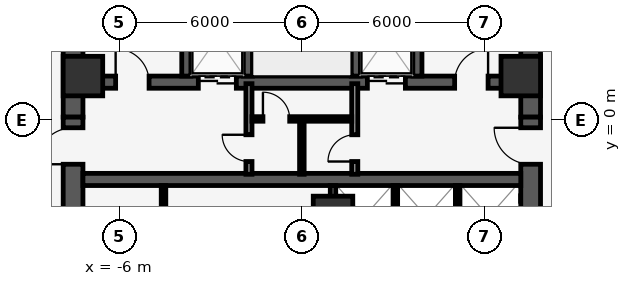
"""IFC4 building model, lengths in metres.
Left out: names, types, materials, properties, quantities, classifications, styles, units other than length and angle.
Written with IfcOpenShell. Run it as: python <this file> out.ifc"""

import sys

from ifc_helpers import new_model, si_unit, direction, frame, frame_2d, origin, origin_2d, place, context, subcontext, project, spatial, rectangle, extrude, element, fill, save


model = new_model("IFC4")
c1 = context("Model", 3, precision=1e-05, world=origin(), true_north=direction((0.0, 1.0)))
c2 = subcontext(c1, "Body", "Model", "MODEL_VIEW")
j1 = project(units=[si_unit("LENGTHUNIT", "METRE"), si_unit("PLANEANGLEUNIT", "RADIAN")], contexts=[c1])
p1 = place(None, origin())
s1 = spatial("IfcSite", under=j1, at=p1, CompositionType="ELEMENT")
p2 = place(p1, origin())
s2 = spatial("IfcBuilding", under=s1, at=p2, CompositionType="ELEMENT")
p3 = place(p2, frame((0.0, 0.0, 144.5)))
s3 = spatial("IfcBuildingStorey", under=s2, at=p3, CompositionType="ELEMENT", Elevation=144.5)
p4 = place(p3, frame((-7.2, 1.25, 0.0), z_axis=(0.0, 0.0, 1.0), x_axis=(1.0, 0.0, 0.0)))
e1 = element("IfcWall", 1, at=p4, inside=s3, PredefinedType="SHEAR", context=c2, shape_type="SweptSolid", body=[
    extrude(rectangle(XDim=14.4, YDim=0.4, at=frame_2d((7.2, 0.0))), origin(), (0.0, 0.0, 1.0), 3.85),
])
p5 = place(p4, frame((3.795, 0.0, 0.0)))
e2 = element("IfcOpeningElement", 2, at=p5, cuts=e1, PredefinedType="OPENING", context=c2, shape_type="SweptSolid", body=[
    extrude(rectangle(XDim=1.25, YDim=2.25, at=frame_2d((0.625, 1.125))), frame((0.0, 0.21, 0.0), z_axis=(0.0, -1.0, 0.0), x_axis=(1.0, 0.0, 0.0)), (0.0, 0.0, 1.0), 0.42),
])
p6 = place(p4, frame((9.355, 0.0, 0.0)))
e3 = element("IfcOpeningElement", 3, at=p6, cuts=e1, PredefinedType="OPENING", context=c2, shape_type="SweptSolid", body=[
    extrude(rectangle(XDim=1.25, YDim=2.25, at=frame_2d((0.625, 1.125))), frame((0.0, 0.21, 0.0), z_axis=(0.0, -1.0, 0.0), x_axis=(1.0, 0.0, 0.0)), (0.0, 0.0, 1.0), 0.42),
])
p7 = place(p4, frame((1.075, 0.0, 0.0)))
e4 = element("IfcOpeningElement", 4, at=p7, cuts=e1, PredefinedType="OPENING", context=c2, shape_type="SweptSolid", body=[
    extrude(rectangle(XDim=1.1, YDim=2.15, at=frame_2d((0.55, 1.075))), frame((0.0, 0.21, 0.0), z_axis=(0.0, -1.0, 0.0), x_axis=(1.0, 0.0, 0.0)), (0.0, 0.0, 1.0), 0.42),
])
p8 = place(p4, frame((12.225, 0.0, 0.0)))
e5 = element("IfcOpeningElement", 5, at=p8, cuts=e1, PredefinedType="OPENING", context=c2, shape_type="SweptSolid", body=[
    extrude(rectangle(XDim=1.1, YDim=2.15, at=frame_2d((0.55, 1.075))), frame((0.0, 0.21, 0.0), z_axis=(0.0, -1.0, 0.0), x_axis=(1.0, 0.0, 0.0)), (0.0, 0.0, 1.0), 0.42),
])
for number, where, z_axis, x_axis in (
    (6, (-3.8, 1.45, 0.0), (0.0, 0.0, 1.0), (0.0, 1.0, 0.0)),
    (7, (-1.775, 1.45, 0.0), (0.0, 0.0, 1.0), (0.0, 1.0, 0.0)),
    (8, (1.775, 1.45, 0.0), (0.0, 0.0, 1.0), (0.0, 1.0, 0.0)),
    (9, (3.8, 1.45, 0.0), (0.0, 0.0, 1.0), (0.0, 1.0, 0.0)),
):
    element("IfcWall", number, at=place(p3, frame(where, z_axis=z_axis, x_axis=x_axis)), inside=s3, PredefinedType="SHEAR", context=c2, shape_type="SweptSolid", body=[
        extrude(rectangle(XDim=7.7, YDim=0.3, at=frame_2d((3.85, 0.0))), origin(), (0.0, 0.0, 1.0), 3.85),
    ])
for number, where, z_axis, x_axis in (
    (10, (-7.525, 0.1, 0.0), (0.0, 0.0, 1.0), (0.0, 1.0, 0.0)),
    (11, (7.525, 0.1, 0.0), (0.0, 0.0, 1.0), (0.0, 1.0, 0.0)),
):
    element("IfcWall", number, at=place(p3, frame(where, z_axis=z_axis, x_axis=x_axis)), inside=s3, PredefinedType="SHEAR", context=c2, shape_type="SweptSolid", body=[
        extrude(rectangle(XDim=9.05, YDim=0.65, at=frame_2d((4.525, 0.0))), origin(), (0.0, 0.0, 1.0), 3.85),
    ])
p9 = place(p3, frame((-7.525, -8.925, 0.0), z_axis=(0.0, 0.0, 1.0), x_axis=(0.0, 1.0, 0.0)))
e12 = element("IfcWall", 12, at=p9, inside=s3, PredefinedType="SHEAR", context=c2, shape_type="SweptSolid", body=[
    extrude(rectangle(XDim=9.025, YDim=0.65, at=frame_2d((4.513, 0.0))), origin(), (0.0, 0.0, 1.0), 3.85),
])
p10 = place(p9, frame((2.565, 0.0, 0.0)))
e13 = element("IfcOpeningElement", 13, at=p10, cuts=e12, PredefinedType="OPENING", context=c2, shape_type="SweptSolid", body=[
    extrude(rectangle(XDim=1.8, YDim=2.2, at=frame_2d((0.9, 1.1))), frame((0.0, 0.335, 0.0), z_axis=(0.0, -1.0, 0.0), x_axis=(1.0, 0.0, 0.0)), (0.0, 0.0, 1.0), 0.67),
])
p11 = place(p9, frame((7.475, 0.0, 0.0)))
e14 = element("IfcOpeningElement", 14, at=p11, cuts=e12, PredefinedType="OPENING", context=c2, shape_type="SweptSolid", body=[
    extrude(rectangle(XDim=1.2, YDim=2.15, at=frame_2d((0.6, 1.075))), frame((0.0, 0.335, 0.0), z_axis=(0.0, -1.0, 0.0), x_axis=(1.0, 0.0, 0.0)), (0.0, 0.0, 1.0), 0.67),
])
p12 = place(p3, frame((7.525, -8.925, 0.0), z_axis=(0.0, 0.0, 1.0), x_axis=(0.0, 1.0, 0.0)))
e15 = element("IfcWall", 15, at=p12, inside=s3, PredefinedType="SHEAR", context=c2, shape_type="SweptSolid", body=[
    extrude(rectangle(XDim=9.025, YDim=0.65, at=frame_2d((4.513, 0.0))), origin(), (0.0, 0.0, 1.0), 3.85),
])
p13 = place(p12, frame((2.565, 0.0, 0.0)))
e16 = element("IfcOpeningElement", 16, at=p13, cuts=e15, PredefinedType="OPENING", context=c2, shape_type="SweptSolid", body=[
    extrude(rectangle(XDim=1.8, YDim=2.2, at=frame_2d((0.9, 1.1))), frame((0.0, 0.335, 0.0), z_axis=(0.0, -1.0, 0.0), x_axis=(1.0, 0.0, 0.0)), (0.0, 0.0, 1.0), 0.67),
])
p14 = place(p12, frame((7.475, 0.0, 0.0)))
e17 = element("IfcOpeningElement", 17, at=p14, cuts=e15, PredefinedType="OPENING", context=c2, shape_type="SweptSolid", body=[
    extrude(rectangle(XDim=1.2, YDim=2.15, at=frame_2d((0.6, 1.075))), frame((0.0, 0.335, 0.0), z_axis=(0.0, -1.0, 0.0), x_axis=(1.0, 0.0, 0.0)), (0.0, 0.0, 1.0), 0.67),
])
p15 = place(p3, frame((-7.2, -1.95, 0.0), z_axis=(0.0, 0.0, 1.0), x_axis=(1.0, 0.0, 0.0)))
e18 = element("IfcWall", 18, at=p15, inside=s3, PredefinedType="SHEAR", context=c2, shape_type="SweptSolid", body=[
    extrude(rectangle(XDim=14.4, YDim=0.4, at=frame_2d((7.2, 0.0))), origin(), (0.0, 0.0, 1.0), 3.85),
])
for number, where, z_axis, x_axis in (
    (19, (7.2, 1.45, 0.0), (0.0, 0.0, 1.0), (1.0, 0.0, 0.0)),
    (20, (-7.2, 1.45, 0.0), (0.0, 0.0, 1.0), (1.0, 0.0, 0.0)),
    (21, (1.025, -3.15, 0.0), (0.0, 0.0, 1.0), (1.0, 0.0, 0.0)),
):
    element("IfcColumn", number, at=place(p3, frame(where, z_axis=z_axis, x_axis=x_axis)), inside=s3, PredefinedType="COLUMN", context=c2, shape_type="SweptSolid", body=[
        extrude(rectangle(XDim=1.3, YDim=1.3, at=origin_2d()), origin(), (0.0, 0.0, 1.0), 4.1),
    ])
p16 = place(p3, frame((-8.762, 34.748, 0.0), z_axis=(0.0, 0.0, 1.0), x_axis=(0.780669916438, -0.624943582708, 0.0)))
e22 = element("IfcWall", 22, at=p16, inside=s3, PredefinedType="STANDARD", context=c2, shape_type="SweptSolid", body=[
    extrude(rectangle(XDim=58.093, YDim=0.3, at=frame_2d((29.046, 0.0))), origin(), (0.0, 0.0, 1.0), 3.85),
])
p17 = place(p16, frame((5.947, 0.0, 0.85)))
e23 = element("IfcOpeningElement", 23, at=p17, cuts=e22, PredefinedType="OPENING", context=c2, shape_type="SweptSolid", body=[
    extrude(rectangle(XDim=1.4, YDim=2.2, at=frame_2d((0.7, 1.1))), frame((0.0, 0.16, 0.0), z_axis=(0.0, -1.0, 0.0), x_axis=(1.0, 0.0, 0.0)), (0.0, 0.0, 1.0), 0.32),
])
p18 = place(p16, frame((11.547, 0.0, 0.85)))
e24 = element("IfcOpeningElement", 24, at=p18, cuts=e22, PredefinedType="OPENING", context=c2, shape_type="SweptSolid", body=[
    extrude(rectangle(XDim=1.4, YDim=2.2, at=frame_2d((0.7, 1.1))), frame((0.0, 0.16, 0.0), z_axis=(0.0, -1.0, 0.0), x_axis=(1.0, 0.0, 0.0)), (0.0, 0.0, 1.0), 0.32),
])
p19 = place(p16, frame((17.146, 0.0, 0.85)))
e25 = element("IfcOpeningElement", 25, at=p19, cuts=e22, PredefinedType="OPENING", context=c2, shape_type="SweptSolid", body=[
    extrude(rectangle(XDim=1.4, YDim=2.2, at=frame_2d((0.7, 1.1))), frame((0.0, 0.16, 0.0), z_axis=(0.0, -1.0, 0.0), x_axis=(1.0, 0.0, 0.0)), (0.0, 0.0, 1.0), 0.32),
])
p20 = place(p16, frame((22.747, 0.0, 0.85)))
e26 = element("IfcOpeningElement", 26, at=p20, cuts=e22, PredefinedType="OPENING", context=c2, shape_type="SweptSolid", body=[
    extrude(rectangle(XDim=1.4, YDim=2.2, at=frame_2d((0.7, 1.1))), frame((0.0, 0.16, 0.0), z_axis=(0.0, -1.0, 0.0), x_axis=(1.0, 0.0, 0.0)), (0.0, 0.0, 1.0), 0.32),
])
p21 = place(p16, frame((28.347, 0.0, 0.85)))
e27 = element("IfcOpeningElement", 27, at=p21, cuts=e22, PredefinedType="OPENING", context=c2, shape_type="SweptSolid", body=[
    extrude(rectangle(XDim=1.4, YDim=2.2, at=frame_2d((0.7, 1.1))), frame((0.0, 0.16, 0.0), z_axis=(0.0, -1.0, 0.0), x_axis=(1.0, 0.0, 0.0)), (0.0, 0.0, 1.0), 0.32),
])
p22 = place(p16, frame((33.947, 0.0, 0.85)))
e28 = element("IfcOpeningElement", 28, at=p22, cuts=e22, PredefinedType="OPENING", context=c2, shape_type="SweptSolid", body=[
    extrude(rectangle(XDim=1.4, YDim=2.2, at=frame_2d((0.7, 1.1))), frame((0.0, 0.16, 0.0), z_axis=(0.0, -1.0, 0.0), x_axis=(1.0, 0.0, 0.0)), (0.0, 0.0, 1.0), 0.32),
])
p23 = place(p16, frame((39.547, 0.0, 0.85)))
e29 = element("IfcOpeningElement", 29, at=p23, cuts=e22, PredefinedType="OPENING", context=c2, shape_type="SweptSolid", body=[
    extrude(rectangle(XDim=1.4, YDim=2.2, at=frame_2d((0.7, 1.1))), frame((0.0, 0.16, 0.0), z_axis=(0.0, -1.0, 0.0), x_axis=(1.0, 0.0, 0.0)), (0.0, 0.0, 1.0), 0.32),
])
p24 = place(p16, frame((45.146, 0.0, 0.85)))
e30 = element("IfcOpeningElement", 30, at=p24, cuts=e22, PredefinedType="OPENING", context=c2, shape_type="SweptSolid", body=[
    extrude(rectangle(XDim=1.4, YDim=2.2, at=frame_2d((0.7, 1.1))), frame((0.0, 0.16, 0.0), z_axis=(0.0, -1.0, 0.0), x_axis=(1.0, 0.0, 0.0)), (0.0, 0.0, 1.0), 0.32),
])
p25 = place(p16, frame((50.747, 0.0, 0.85)))
e31 = element("IfcOpeningElement", 31, at=p25, cuts=e22, PredefinedType="OPENING", context=c2, shape_type="SweptSolid", body=[
    extrude(rectangle(XDim=1.4, YDim=2.2, at=frame_2d((0.7, 1.1))), frame((0.0, 0.16, 0.0), z_axis=(0.0, -1.0, 0.0), x_axis=(1.0, 0.0, 0.0)), (0.0, 0.0, 1.0), 0.32),
])
p26 = place(p3, frame((1.025, -4.18, 0.0), z_axis=(0.0, 0.0, 1.0), x_axis=(0.0, 1.0, 0.0)))
e32 = element("IfcWall", 32, at=p26, inside=s3, PredefinedType="PARTITIONING", context=c2, shape_type="SweptSolid", body=[
    extrude(rectangle(XDim=2.03, YDim=0.18, at=frame_2d((1.015, 0.0))), origin(), (0.0, 0.0, 1.0), 2.898),
])
for number, where, z_axis, x_axis in (
    (33, (-4.55, -4.18, 0.0), (0.0, 0.0, 1.0), (0.0, 1.0, 0.0)),
    (34, (3.075, -4.18, 0.0), (0.0, 0.0, 1.0), (0.0, 1.0, 0.0)),
    (35, (5.125, -4.18, 0.0), (0.0, 0.0, 1.0), (0.0, 1.0, 0.0)),
):
    element("IfcWall", number, at=place(p3, frame(where, z_axis=z_axis, x_axis=x_axis)), inside=s3, PredefinedType="PARTITIONING", context=c2, shape_type="SweptSolid", body=[
        extrude(rectangle(XDim=2.03, YDim=0.15, at=frame_2d((1.015, 0.0))), origin(), (0.0, 0.0, 1.0), 3.85),
    ])
p27 = place(p3, frame((-1.74, -1.78, 0.0), z_axis=(0.0, 0.0, 1.0), x_axis=(0.0, 1.0, 0.0)))
e36 = element("IfcWall", 36, at=p27, inside=s3, PredefinedType="PARTITIONING", context=c2, shape_type="SweptSolid", body=[
    extrude(rectangle(XDim=2.98, YDim=0.2, at=frame_2d((1.49, 0.0))), origin(), (0.0, 0.0, 1.0), 3.85),
])
p28 = place(p27, frame((0.42, 0.0, 0.0)))
e37 = element("IfcOpeningElement", 37, at=p28, cuts=e36, PredefinedType="OPENING", context=c2, shape_type="SweptSolid", body=[
    extrude(rectangle(XDim=0.88, YDim=2.15, at=frame_2d((0.44, 1.075))), frame((0.0, 0.11, 0.0), z_axis=(0.0, -1.0, 0.0), x_axis=(1.0, 0.0, 0.0)), (0.0, 0.0, 1.0), 0.22),
])
p29 = place(p3, frame((1.74, -1.78, 0.0), z_axis=(0.0, 0.0, 1.0), x_axis=(0.0, 1.0, 0.0)))
e38 = element("IfcWall", 38, at=p29, inside=s3, PredefinedType="PARTITIONING", context=c2, shape_type="SweptSolid", body=[
    extrude(rectangle(XDim=2.98, YDim=0.2, at=frame_2d((1.49, 0.0))), origin(), (0.0, 0.0, 1.0), 3.85),
])
p30 = place(p29, frame((0.42, 0.0, 0.0)))
e39 = element("IfcOpeningElement", 39, at=p30, cuts=e38, PredefinedType="OPENING", context=c2, shape_type="SweptSolid", body=[
    extrude(rectangle(XDim=0.88, YDim=2.15, at=frame_2d((0.44, 1.075))), frame((0.0, 0.11, 0.0), z_axis=(0.0, -1.0, 0.0), x_axis=(1.0, 0.0, 0.0)), (0.0, 0.0, 1.0), 0.22),
])
p31 = place(p3, frame((-1.64, 0.04, 0.0), z_axis=(0.0, 0.0, 1.0), x_axis=(1.0, 0.0, 0.0)))
e40 = element("IfcWall", 40, at=p31, inside=s3, PredefinedType="PARTITIONING", context=c2, shape_type="SweptSolid", body=[
    extrude(rectangle(XDim=3.28, YDim=0.15, at=frame_2d((1.64, 0.0))), origin(), (0.0, 0.0, 1.0), 3.85),
])
p32 = place(p31, frame((0.36, 0.0, 0.0)))
e41 = element("IfcOpeningElement", 41, at=p32, cuts=e40, PredefinedType="OPENING", context=c2, shape_type="SweptSolid", body=[
    extrude(rectangle(XDim=0.88, YDim=2.1, at=frame_2d((0.44, 1.05))), frame((0.0, 0.085, 0.0), z_axis=(0.0, -1.0, 0.0), x_axis=(1.0, 0.0, 0.0)), (0.0, 0.0, 1.0), 0.17),
])
p33 = place(p3, frame((0.0, -1.78, 0.0), z_axis=(0.0, 0.0, 1.0), x_axis=(0.0, 1.0, 0.0)))
e42 = element("IfcWall", 42, at=p33, inside=s3, PredefinedType="PARTITIONING", context=c2, shape_type="SweptSolid", body=[
    extrude(rectangle(XDim=1.73, YDim=0.15, at=frame_2d((0.865, 0.0))), origin(), (0.0, 0.0, 1.0), 3.85),
])
p34 = place(p5, origin())
e43 = element("IfcDoor", 43, at=p34, inside=s3, OperationType="DOUBLE_DOOR_SLIDING", PredefinedType="DOOR", context=c2, shape_type="SweptSolid", body=[
    extrude(rectangle(XDim=1.25, YDim=2.25, at=frame_2d((0.625, 1.125))), frame((0.0, 0.025, 0.0), z_axis=(0.0, -1.0, 0.0), x_axis=(1.0, 0.0, 0.0)), (0.0, 0.0, 1.0), 0.05),
])
fill(e2, e43)
p35 = place(p6, origin())
e44 = element("IfcDoor", 44, at=p35, inside=s3, OperationType="DOUBLE_DOOR_SLIDING", PredefinedType="DOOR", context=c2, shape_type="SweptSolid", body=[
    extrude(rectangle(XDim=1.25, YDim=2.25, at=frame_2d((0.625, 1.125))), frame((0.0, 0.025, 0.0), z_axis=(0.0, -1.0, 0.0), x_axis=(1.0, 0.0, 0.0)), (0.0, 0.0, 1.0), 0.05),
])
fill(e3, e44)
p36 = place(p7, origin())
e45 = element("IfcDoor", 45, at=p36, inside=s3, OperationType="SINGLE_SWING_LEFT", PredefinedType="DOOR", context=c2, shape_type="SweptSolid", body=[
    extrude(rectangle(XDim=1.1, YDim=2.15, at=frame_2d((0.55, 1.075))), frame((0.0, 0.025, 0.0), z_axis=(0.0, -1.0, 0.0), x_axis=(1.0, 0.0, 0.0)), (0.0, 0.0, 1.0), 0.05),
])
fill(e4, e45)
p37 = place(p8, origin())
e46 = element("IfcDoor", 46, at=p37, inside=s3, OperationType="SINGLE_SWING_RIGHT", PredefinedType="DOOR", context=c2, shape_type="SweptSolid", body=[
    extrude(rectangle(XDim=1.1, YDim=2.15, at=frame_2d((0.55, 1.075))), frame((0.0, 0.025, 0.0), z_axis=(0.0, -1.0, 0.0), x_axis=(1.0, 0.0, 0.0)), (0.0, 0.0, 1.0), 0.05),
])
fill(e5, e46)
p38 = place(p11, origin())
e47 = element("IfcDoor", 47, at=p38, inside=s3, OperationType="SINGLE_SWING_LEFT", PredefinedType="DOOR", context=c2, shape_type="SweptSolid", body=[
    extrude(rectangle(XDim=1.2, YDim=2.15, at=frame_2d((0.6, 1.075))), frame((0.0, 0.025, 0.0), z_axis=(0.0, -1.0, 0.0), x_axis=(1.0, 0.0, 0.0)), (0.0, 0.0, 1.0), 0.05),
])
fill(e14, e47)
p39 = place(p14, origin())
e48 = element("IfcDoor", 48, at=p39, inside=s3, OperationType="SINGLE_SWING_RIGHT", PredefinedType="DOOR", context=c2, shape_type="SweptSolid", body=[
    extrude(rectangle(XDim=1.2, YDim=2.15, at=frame_2d((0.6, 1.075))), frame((0.0, 0.025, 0.0), z_axis=(0.0, -1.0, 0.0), x_axis=(1.0, 0.0, 0.0)), (0.0, 0.0, 1.0), 0.05),
])
fill(e17, e48)
p40 = place(p32, origin())
e49 = element("IfcDoor", 49, at=p40, inside=s3, OperationType="SINGLE_SWING_LEFT", PredefinedType="DOOR", context=c2, shape_type="SweptSolid", body=[
    extrude(rectangle(XDim=0.88, YDim=2.1, at=frame_2d((0.44, 1.05))), frame((0.0, 0.025, 0.0), z_axis=(0.0, -1.0, 0.0), x_axis=(1.0, 0.0, 0.0)), (0.0, 0.0, 1.0), 0.05),
])
fill(e41, e49)
p41 = place(p28, origin())
e50 = element("IfcDoor", 50, at=p41, inside=s3, OperationType="SINGLE_SWING_RIGHT", PredefinedType="DOOR", context=c2, shape_type="SweptSolid", body=[
    extrude(rectangle(XDim=0.88, YDim=2.15, at=frame_2d((0.44, 1.075))), frame((0.0, 0.025, 0.0), z_axis=(0.0, -1.0, 0.0), x_axis=(1.0, 0.0, 0.0)), (0.0, 0.0, 1.0), 0.05),
])
fill(e37, e50)
p42 = place(p30, origin())
e51 = element("IfcDoor", 51, at=p42, inside=s3, OperationType="SINGLE_SWING_LEFT", PredefinedType="DOOR", context=c2, shape_type="SweptSolid", body=[
    extrude(rectangle(XDim=0.88, YDim=2.15, at=frame_2d((0.44, 1.075))), frame((0.0, 0.025, 0.0), z_axis=(0.0, -1.0, 0.0), x_axis=(1.0, 0.0, 0.0)), (0.0, 0.0, 1.0), 0.05),
])
fill(e39, e51)
save(model, sys.argv[1])
